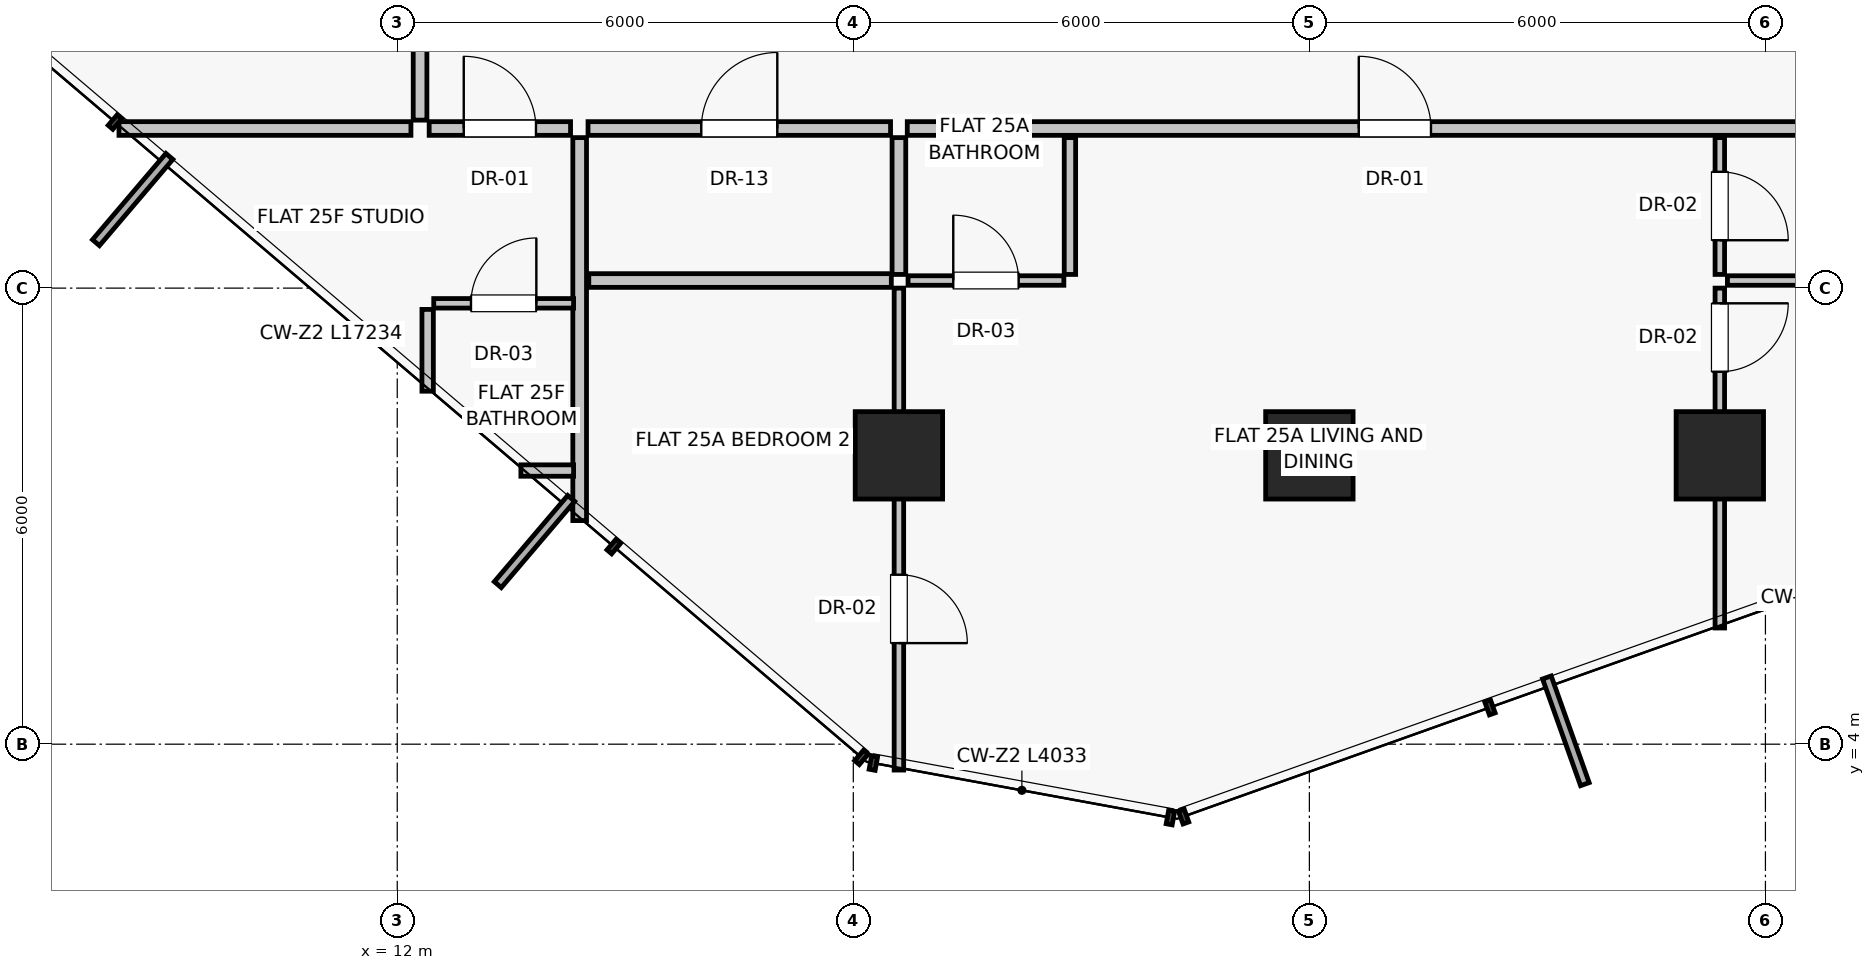
"""IFC4 building model, lengths in metres.
Left out: names, types, materials, properties, quantities, classifications, styles, units other than length and angle.
Written with IfcOpenShell. Run it as: python <this file> out.ifc"""

import sys

from ifc_helpers import new_model, si_unit, direction, frame, frame_2d, origin, origin_2d, place, context, subcontext, project, spatial, rectangle, extrude, source, transform, mapped, element, fill, save


model = new_model("IFC4")
c1 = context("Model", 3, precision=1e-05, world=origin(), true_north=direction((0.0, 1.0)))
c2 = subcontext(c1, "Body", "Model", "MODEL_VIEW")
j1 = project(units=[si_unit("LENGTHUNIT", "METRE"), si_unit("PLANEANGLEUNIT", "RADIAN")], contexts=[c1])
p1 = place(None, origin())
s1 = spatial("IfcSite", under=j1, at=p1, CompositionType="ELEMENT")
p2 = place(p1, origin())
s2 = spatial("IfcBuilding", under=s1, at=p2, CompositionType="ELEMENT")
p3 = place(p2, frame((0.0, 0.0, 92.7)))
s3 = spatial("IfcBuildingStorey", under=s2, at=p3, CompositionType="ELEMENT", Elevation=92.7)
for number, where, z_axis, x_axis in (
    (1, (18.6, 7.8, 0.0), (0.0, 0.0, 1.0), (1.0, 0.0, 0.0)),
    (2, (24.0, 7.8, 0.0), (0.0, 0.0, 1.0), (1.0, 0.0, 0.0)),
    (3, (29.4, 7.8, 0.0), (0.0, 0.0, 1.0), (1.0, 0.0, 0.0)),
):
    element("IfcColumn", number, at=place(p3, frame(where, z_axis=z_axis, x_axis=x_axis)), inside=s3, PredefinedType="COLUMN", context=c2, shape_type="SweptSolid", body=[
        extrude(rectangle(XDim=1.15, YDim=1.15, at=origin_2d()), origin(), (0.0, 0.0, 1.0), 3.25),
    ])
p4 = place(p3, frame((14.4, 11.98, 0.0), z_axis=(0.0, 0.0, 1.0), x_axis=(0.0, -1.0, 0.0)))
e4 = element("IfcWall", 4, at=p4, inside=s3, PredefinedType="PARTITIONING", context=c2, shape_type="SweptSolid", body=[
    extrude(rectangle(XDim=5.038, YDim=0.18, at=frame_2d((2.519, 0.0))), origin(), (0.0, 0.0, 1.0), 3.0),
])
p5 = place(p3, frame((14.51, 12.1, 0.0), z_axis=(0.0, 0.0, 1.0), x_axis=(1.0, 0.0, 0.0)))
e5 = element("IfcWall", 5, at=p5, inside=s3, PredefinedType="PARTITIONING", context=c2, shape_type="SweptSolid", body=[
    extrude(rectangle(XDim=3.98, YDim=0.18, at=frame_2d((1.99, 0.0))), origin(), (0.0, 0.0, 1.0), 2.58),
])
p6 = place(p5, frame((1.49, 0.0, 0.0)))
e6 = element("IfcOpeningElement", 6, at=p6, cuts=e5, PredefinedType="OPENING", context=c2, shape_type="SweptSolid", body=[
    extrude(rectangle(XDim=1.0, YDim=2.01, at=frame_2d((0.5, 1.005))), frame((0.0, 0.1, 0.0), z_axis=(0.0, -1.0, 0.0), x_axis=(1.0, 0.0, 0.0)), (0.0, 0.0, 1.0), 0.2),
])
p7 = place(p3, frame((18.71, 12.1, 0.0), z_axis=(0.0, 0.0, 1.0), x_axis=(1.0, 0.0, 0.0)))
e7 = element("IfcWall", 7, at=p7, inside=s3, PredefinedType="PARTITIONING", context=c2, shape_type="SweptSolid", body=[
    extrude(rectangle(XDim=14.78, YDim=0.18, at=frame_2d((7.39, 0.0))), origin(), (0.0, 0.0, 1.0), 2.58),
])
p8 = place(p7, frame((5.94, 0.0, 0.0)))
e8 = element("IfcOpeningElement", 8, at=p8, cuts=e7, PredefinedType="OPENING", context=c2, shape_type="SweptSolid", body=[
    extrude(rectangle(XDim=0.95, YDim=2.02, at=frame_2d((0.475, 1.01))), frame((0.0, 0.1, 0.0), z_axis=(0.0, -1.0, 0.0), x_axis=(1.0, 0.0, 0.0)), (0.0, 0.0, 1.0), 0.2),
])
p9 = place(p3, frame((14.52, 10.1, 0.0), z_axis=(0.0, 0.0, 1.0), x_axis=(1.0, 0.0, 0.0)))
e9 = element("IfcWall", 9, at=p9, inside=s3, PredefinedType="PARTITIONING", context=c2, shape_type="SweptSolid", body=[
    extrude(rectangle(XDim=3.98, YDim=0.18, at=frame_2d((1.99, 0.0))), origin(), (0.0, 0.0, 1.0), 3.0),
])
p10 = place(p3, frame((18.6, 11.98, 0.0), z_axis=(0.0, 0.0, 1.0), x_axis=(0.0, -1.0, 0.0)))
e10 = element("IfcWall", 10, at=p10, inside=s3, PredefinedType="PARTITIONING", context=c2, shape_type="SweptSolid", body=[
    extrude(rectangle(XDim=1.8, YDim=0.18, at=frame_2d((0.9, 0.0))), origin(), (0.0, 0.0, 1.0), 2.378),
])
p11 = place(p3, frame((18.6, 10.0, 0.0), z_axis=(0.0, 0.0, 1.0), x_axis=(0.0, -1.0, 0.0)))
e11 = element("IfcWall", 11, at=p11, inside=s3, PredefinedType="PARTITIONING", context=c2, shape_type="SweptSolid", body=[
    extrude(rectangle(XDim=6.34, YDim=0.125, at=frame_2d((3.17, 0.0))), origin(), (0.0, 0.0, 1.0), 2.378),
])
p12 = place(p11, frame((3.77, 0.0, 0.0)))
e12 = element("IfcOpeningElement", 12, at=p12, cuts=e11, PredefinedType="OPENING", context=c2, shape_type="SweptSolid", body=[
    extrude(rectangle(XDim=0.9, YDim=2.01, at=frame_2d((0.45, 1.005))), frame((0.0, 0.073, 0.0), z_axis=(0.0, -1.0, 0.0), x_axis=(1.0, 0.0, 0.0)), (0.0, 0.0, 1.0), 0.145),
])
p13 = place(p3, frame((20.85, 11.98, 0.0), z_axis=(0.0, 0.0, 1.0), x_axis=(0.0, -1.0, 0.0)))
e13 = element("IfcWall", 13, at=p13, inside=s3, PredefinedType="PARTITIONING", context=c2, shape_type="SweptSolid", body=[
    extrude(rectangle(XDim=1.8, YDim=0.15, at=frame_2d((0.9, 0.0))), origin(), (0.0, 0.0, 1.0), 3.0),
])
p14 = place(p3, frame((18.72, 10.1, 0.0), z_axis=(0.0, 0.0, 1.0), x_axis=(1.0, 0.0, 0.0)))
e14 = element("IfcWall", 14, at=p14, inside=s3, PredefinedType="PARTITIONING", context=c2, shape_type="SweptSolid", body=[
    extrude(rectangle(XDim=2.05, YDim=0.125, at=frame_2d((1.025, 0.0))), origin(), (0.0, 0.0, 1.0), 3.0),
])
p15 = place(p14, frame((0.595, 0.0, 0.0)))
e15 = element("IfcOpeningElement", 15, at=p15, cuts=e14, PredefinedType="OPENING", context=c2, shape_type="SweptSolid", body=[
    extrude(rectangle(XDim=0.86, YDim=2.01, at=frame_2d((0.43, 1.005))), frame((0.0, 0.073, 0.0), z_axis=(0.0, -1.0, 0.0), x_axis=(1.0, 0.0, 0.0)), (0.0, 0.0, 1.0), 0.145),
])
p16 = place(p3, frame((29.4, 11.98, 0.0), z_axis=(0.0, 0.0, 1.0), x_axis=(0.0, -1.0, 0.0)))
e16 = element("IfcWall", 16, at=p16, inside=s3, PredefinedType="PARTITIONING", context=c2, shape_type="SweptSolid", body=[
    extrude(rectangle(XDim=1.8, YDim=0.125, at=frame_2d((0.9, 0.0))), origin(), (0.0, 0.0, 1.0), 2.378),
])
p17 = place(p16, frame((0.45, 0.0, 0.0)))
e17 = element("IfcOpeningElement", 17, at=p17, cuts=e16, PredefinedType="OPENING", context=c2, shape_type="SweptSolid", body=[
    extrude(rectangle(XDim=0.9, YDim=2.01, at=frame_2d((0.45, 1.005))), frame((0.0, 0.073, 0.0), z_axis=(0.0, -1.0, 0.0), x_axis=(1.0, 0.0, 0.0)), (0.0, 0.0, 1.0), 0.145),
])
p18 = place(p3, frame((29.5, 10.1, 0.0), z_axis=(0.0, 0.0, 1.0), x_axis=(1.0, 0.0, 0.0)))
e18 = element("IfcWall", 18, at=p18, inside=s3, PredefinedType="PARTITIONING", context=c2, shape_type="SweptSolid", body=[
    extrude(rectangle(XDim=3.98, YDim=0.125, at=frame_2d((1.99, 0.0))), origin(), (0.0, 0.0, 1.0), 3.0),
])
p19 = place(p3, frame((29.4, 10.0, 0.0), z_axis=(0.0, 0.0, 1.0), x_axis=(0.0, -1.0, 0.0)))
e19 = element("IfcWall", 19, at=p19, inside=s3, PredefinedType="PARTITIONING", context=c2, shape_type="SweptSolid", body=[
    extrude(rectangle(XDim=4.471, YDim=0.125, at=frame_2d((2.236, 0.0))), origin(), (0.0, 0.0, 1.0), 2.378),
])
p20 = place(p19, frame((0.2, 0.0, 0.0)))
e20 = element("IfcOpeningElement", 20, at=p20, cuts=e19, PredefinedType="OPENING", context=c2, shape_type="SweptSolid", body=[
    extrude(rectangle(XDim=0.9, YDim=2.01, at=frame_2d((0.45, 1.005))), frame((0.0, 0.073, 0.0), z_axis=(0.0, -1.0, 0.0), x_axis=(1.0, 0.0, 0.0)), (0.0, 0.0, 1.0), 0.145),
])
p21 = place(p3, frame((12.18, 12.1, 0.0), z_axis=(0.0, 0.0, 1.0), x_axis=(-1.0, 0.0, 0.0)))
e21 = element("IfcWall", 21, at=p21, inside=s3, PredefinedType="PARTITIONING", context=c2, shape_type="SweptSolid", body=[
    extrude(rectangle(XDim=3.841, YDim=0.18, at=frame_2d((1.92, 0.0))), origin(), (0.0, 0.0, 1.0), 3.0),
])
p22 = place(p3, frame((12.3, 12.21, 0.0), z_axis=(0.0, 0.0, 1.0), x_axis=(0.0, 1.0, 0.0)))
e22 = element("IfcWall", 22, at=p22, inside=s3, PredefinedType="PARTITIONING", context=c2, shape_type="SweptSolid", body=[
    extrude(rectangle(XDim=5.082, YDim=0.18, at=frame_2d((2.541, 0.0))), origin(), (0.0, 0.0, 1.0), 3.0),
])
p23 = place(p22, frame((2.041, 0.0, 0.0)))
e23 = element("IfcOpeningElement", 23, at=p23, cuts=e22, PredefinedType="OPENING", context=c2, shape_type="SweptSolid", body=[
    extrude(rectangle(XDim=1.0, YDim=2.01, at=frame_2d((0.5, 1.005))), frame((0.0, 0.1, 0.0), z_axis=(0.0, -1.0, 0.0), x_axis=(1.0, 0.0, 0.0)), (0.0, 0.0, 1.0), 0.2),
])
p24 = place(p3, frame((12.42, 12.1, 0.0), z_axis=(0.0, 0.0, 1.0), x_axis=(1.0, 0.0, 0.0)))
e24 = element("IfcWall", 24, at=p24, inside=s3, PredefinedType="PARTITIONING", context=c2, shape_type="SweptSolid", body=[
    extrude(rectangle(XDim=1.86, YDim=0.18, at=frame_2d((0.93, 0.0))), origin(), (0.0, 0.0, 1.0), 3.0),
])
p25 = place(p24, frame((0.455, 0.0, 0.0)))
e25 = element("IfcOpeningElement", 25, at=p25, cuts=e24, PredefinedType="OPENING", context=c2, shape_type="SweptSolid", body=[
    extrude(rectangle(XDim=0.95, YDim=2.02, at=frame_2d((0.475, 1.01))), frame((0.0, 0.1, 0.0), z_axis=(0.0, -1.0, 0.0), x_axis=(1.0, 0.0, 0.0)), (0.0, 0.0, 1.0), 0.2),
])
p26 = place(p3, frame((12.48, 9.8, 0.0), z_axis=(0.0, 0.0, 1.0), x_axis=(1.0, 0.0, 0.0)))
e26 = element("IfcWall", 26, at=p26, inside=s3, PredefinedType="PARTITIONING", context=c2, shape_type="SweptSolid", body=[
    extrude(rectangle(XDim=1.84, YDim=0.125, at=frame_2d((0.92, 0.0))), origin(), (0.0, 0.0, 1.0), 3.0),
])
p27 = place(p26, frame((0.49, 0.0, 0.0)))
e27 = element("IfcOpeningElement", 27, at=p27, cuts=e26, PredefinedType="OPENING", context=c2, shape_type="SweptSolid", body=[
    extrude(rectangle(XDim=0.86, YDim=2.01, at=frame_2d((0.43, 1.005))), frame((0.0, 0.073, 0.0), z_axis=(0.0, -1.0, 0.0), x_axis=(1.0, 0.0, 0.0)), (0.0, 0.0, 1.0), 0.145),
])
p28 = place(p3, frame((13.627, 7.6, 0.0), z_axis=(0.0, 0.0, 1.0), x_axis=(1.0, 0.0, 0.0)))
e28 = element("IfcWall", 28, at=p28, inside=s3, PredefinedType="PARTITIONING", context=c2, shape_type="SweptSolid", body=[
    extrude(rectangle(XDim=0.693, YDim=0.15, at=frame_2d((0.347, 0.0))), origin(), (0.0, 0.0, 1.0), 3.0),
])
p29 = place(p3, frame((12.4, 8.644, 0.0), z_axis=(0.0, 0.0, 1.0), x_axis=(0.0, 1.0, 0.0)))
e29 = element("IfcWall", 29, at=p29, inside=s3, PredefinedType="PARTITIONING", context=c2, shape_type="SweptSolid", body=[
    extrude(rectangle(XDim=1.076, YDim=0.15, at=frame_2d((0.538, 0.0))), origin(), (0.0, 0.0, 1.0), 3.0),
])
m1 = source(origin(), c2, "Body", "SweptSolid", [
    extrude(rectangle(XDim=1.0, YDim=2.01, at=frame_2d((0.5, 1.005))), frame((0.0, 0.025, 0.0), z_axis=(0.0, -1.0, 0.0), x_axis=(1.0, 0.0, 0.0)), (0.0, 0.0, 1.0), 0.05),
])
p30 = place(p6, origin())
e30 = element("IfcDoor", 30, at=p30, inside=s3, OperationType="SINGLE_SWING_RIGHT", PredefinedType="DOOR", context=c2, shape_type="MappedRepresentation", body=[
    mapped(m1, transform((0.0, 0.0, 0.0), scale=1.0)),
])
fill(e6, e30)
m2 = source(origin(), c2, "Body", "SweptSolid", [
    extrude(rectangle(XDim=0.95, YDim=2.02, at=frame_2d((0.475, 1.01))), frame((0.0, 0.025, 0.0), z_axis=(0.0, -1.0, 0.0), x_axis=(1.0, 0.0, 0.0)), (0.0, 0.0, 1.0), 0.05),
])
p31 = place(p8, origin())
e31 = element("IfcDoor", 31, at=p31, inside=s3, OperationType="SINGLE_SWING_LEFT", PredefinedType="DOOR", context=c2, shape_type="MappedRepresentation", body=[
    mapped(m2, transform((0.0, 0.0, 0.0), scale=1.0)),
])
fill(e8, e31)
m3 = source(origin(), c2, "Body", "SweptSolid", [
    extrude(rectangle(XDim=0.9, YDim=2.01, at=frame_2d((0.45, 1.005))), frame((0.0, 0.025, 0.0), z_axis=(0.0, -1.0, 0.0), x_axis=(1.0, 0.0, 0.0)), (0.0, 0.0, 1.0), 0.05),
])
p32 = place(p12, origin())
e32 = element("IfcDoor", 32, at=p32, inside=s3, OperationType="SINGLE_SWING_RIGHT", PredefinedType="DOOR", context=c2, shape_type="MappedRepresentation", body=[
    mapped(m3, transform((0.0, 0.0, 0.0), scale=1.0)),
])
fill(e12, e32)
m4 = source(origin(), c2, "Body", "SweptSolid", [
    extrude(rectangle(XDim=0.86, YDim=2.01, at=frame_2d((0.43, 1.005))), frame((0.0, 0.025, 0.0), z_axis=(0.0, -1.0, 0.0), x_axis=(1.0, 0.0, 0.0)), (0.0, 0.0, 1.0), 0.05),
])
p33 = place(p15, origin())
e33 = element("IfcDoor", 33, at=p33, inside=s3, OperationType="SINGLE_SWING_LEFT", PredefinedType="DOOR", context=c2, shape_type="MappedRepresentation", body=[
    mapped(m4, transform((0.0, 0.0, 0.0), scale=1.0)),
])
fill(e15, e33)
p34 = place(p17, origin())
e34 = element("IfcDoor", 34, at=p34, inside=s3, OperationType="SINGLE_SWING_RIGHT", PredefinedType="DOOR", context=c2, shape_type="MappedRepresentation", body=[
    mapped(m3, transform((0.0, 0.0, 0.0), scale=1.0)),
])
fill(e17, e34)
p35 = place(p20, origin())
e35 = element("IfcDoor", 35, at=p35, inside=s3, OperationType="SINGLE_SWING_LEFT", PredefinedType="DOOR", context=c2, shape_type="MappedRepresentation", body=[
    mapped(m3, transform((0.0, 0.0, 0.0), scale=1.0)),
])
fill(e20, e35)
p36 = place(p25, origin())
e36 = element("IfcDoor", 36, at=p36, inside=s3, OperationType="SINGLE_SWING_LEFT", PredefinedType="DOOR", context=c2, shape_type="MappedRepresentation", body=[
    mapped(m2, transform((0.0, 0.0, 0.0), scale=1.0)),
])
fill(e25, e36)
p37 = place(p27, origin())
e37 = element("IfcDoor", 37, at=p37, inside=s3, OperationType="SINGLE_SWING_RIGHT", PredefinedType="DOOR", context=c2, shape_type="MappedRepresentation", body=[
    mapped(m4, transform((0.0, 0.0, 0.0), scale=1.0)),
])
fill(e27, e37)
save(model, sys.argv[1])
